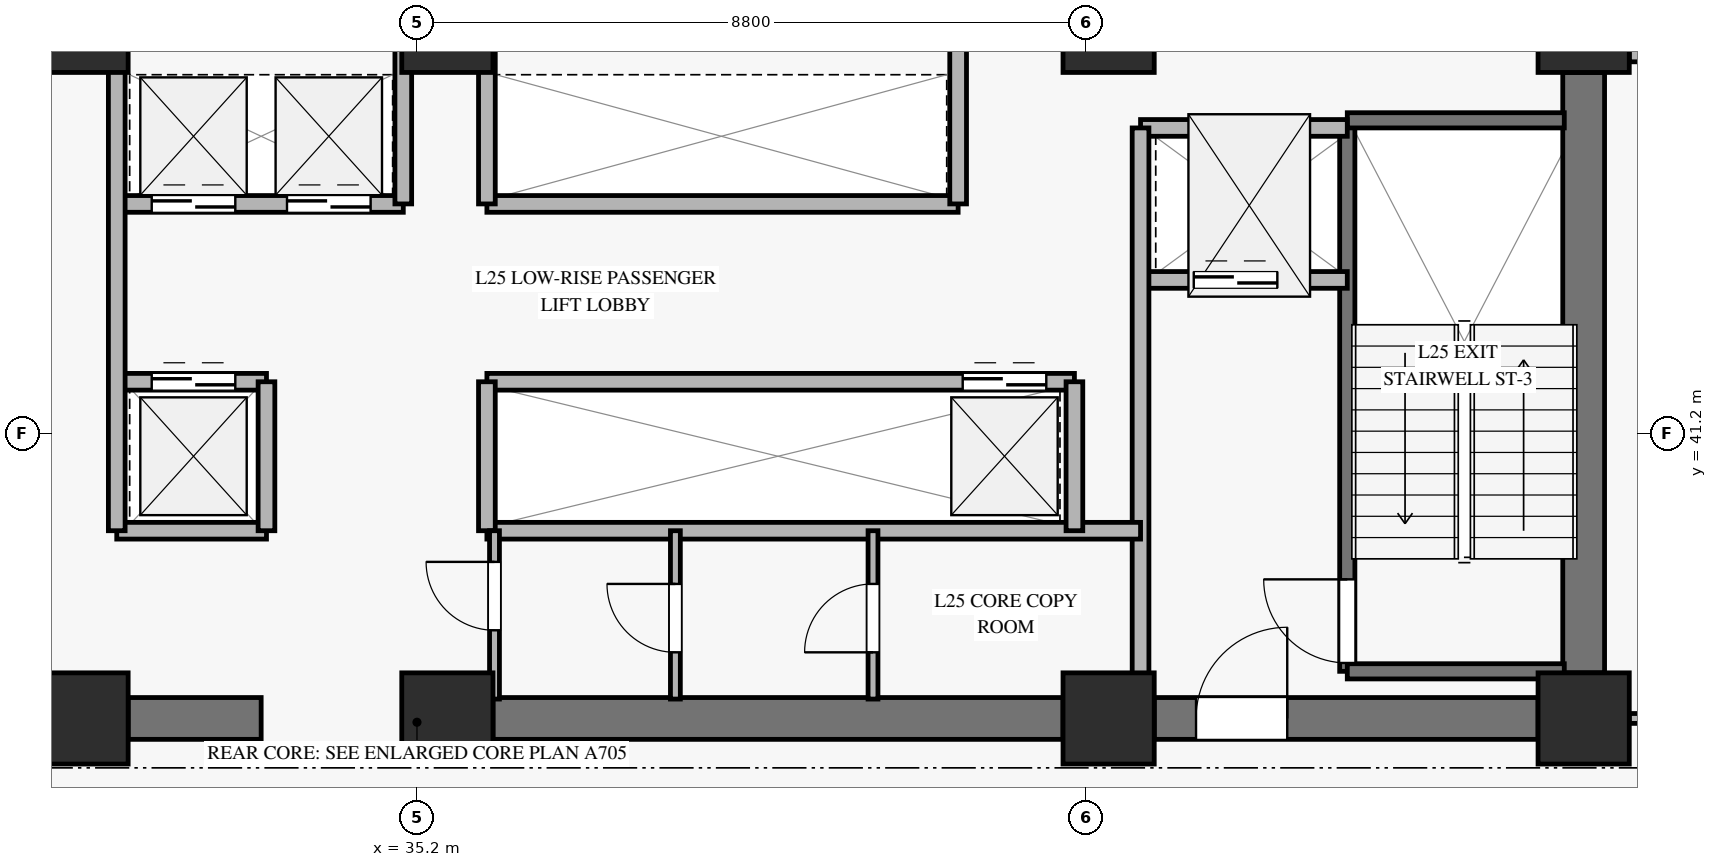
"""IFC4 building model, lengths in metres.
Left out: names, types, materials, properties, quantities, classifications, styles, units other than length and angle.
Written with IfcOpenShell. Run it as: python <this file> out.ifc"""

import sys

from ifc_helpers import new_model, si_unit, direction, frame, frame_2d, origin, origin_2d, place, context, subcontext, project, spatial, rectangle, extrude, source, transform, mapped, element, fill, save


model = new_model("IFC4")
c1 = context("Model", 3, precision=1e-05, world=origin(), true_north=direction((0.0, 1.0)))
c2 = subcontext(c1, "Body", "Model", "MODEL_VIEW")
j1 = project(units=[si_unit("LENGTHUNIT", "METRE"), si_unit("PLANEANGLEUNIT", "RADIAN")], contexts=[c1])
p1 = place(None, origin())
s1 = spatial("IfcSite", under=j1, at=p1, CompositionType="ELEMENT")
p2 = place(p1, origin())
s2 = spatial("IfcBuilding", under=s1, at=p2, CompositionType="ELEMENT")
p3 = place(p2, frame((0.0, 0.0, 103.6)))
s3 = spatial("IfcBuildingStorey", under=s2, at=p3, CompositionType="ELEMENT", Elevation=103.6)
m1 = source(origin(), c2, "Body", "SweptSolid", [
    extrude(rectangle(XDim=1.2, YDim=1.2, at=origin_2d()), origin(), (0.0, 0.0, 1.0), 3.68),
])
for number, where, z_axis, x_axis in (
    (1, (30.8, 37.45, 0.0), (0.0, 0.0, 1.0), (1.0, 0.0, 0.0)),
    (2, (30.8, 46.55, 0.0), (0.0, 0.0, 1.0), (1.0, 0.0, 0.0)),
    (3, (35.6, 37.45, 0.0), (0.0, 0.0, 1.0), (1.0, 0.0, 0.0)),
    (4, (35.6, 46.55, 0.0), (0.0, 0.0, 1.0), (1.0, 0.0, 0.0)),
    (5, (44.3, 37.45, 0.0), (0.0, 0.0, 1.0), (1.0, 0.0, 0.0)),
    (6, (44.3, 46.55, 0.0), (0.0, 0.0, 1.0), (1.0, 0.0, 0.0)),
    (7, (50.55, 37.45, 0.0), (0.0, 0.0, 1.0), (1.0, 0.0, 0.0)),
    (8, (50.55, 46.55, 0.0), (0.0, 0.0, 1.0), (1.0, 0.0, 0.0)),
):
    element("IfcColumn", number, at=place(p3, frame(where, z_axis=z_axis, x_axis=x_axis)), inside=s3, PredefinedType="PILASTER", context=c2, shape_type="MappedRepresentation", body=[
        mapped(m1, transform((0.0, 0.0, 0.0), x_axis=(1.0, 0.0, 0.0), y_axis=(0.0, 1.0, 0.0), z_axis=(0.0, 0.0, 1.0), scale=1.0)),
    ])
p4 = place(p3, frame((31.4, 37.45, 0.0), z_axis=(0.0, 0.0, 1.0), x_axis=(1.0, 0.0, 0.0)))
e9 = element("IfcWall", 9, at=p4, inside=s3, PredefinedType="SHEAR", context=c2, shape_type="SweptSolid", body=[
    extrude(rectangle(XDim=1.75, YDim=0.55, at=frame_2d((0.875, 0.0))), origin(), (0.0, 0.0, 1.0), 3.68),
])
p5 = place(p3, frame((36.2, 37.45, 0.0), z_axis=(0.0, 0.0, 1.0), x_axis=(1.0, 0.0, 0.0)))
e10 = element("IfcWall", 10, at=p5, inside=s3, PredefinedType="SHEAR", context=c2, shape_type="SweptSolid", body=[
    extrude(rectangle(XDim=7.5, YDim=0.55, at=frame_2d((3.75, 0.0))), origin(), (0.0, 0.0, 1.0), 3.68),
])
p6 = place(p3, frame((44.9, 37.45, 0.0), z_axis=(0.0, 0.0, 1.0), x_axis=(1.0, 0.0, 0.0)))
e11 = element("IfcWall", 11, at=p6, inside=s3, PredefinedType="SHEAR", context=c2, shape_type="SweptSolid", body=[
    extrude(rectangle(XDim=5.05, YDim=0.55, at=frame_2d((2.525, 0.0))), origin(), (0.0, 0.0, 1.0), 3.68),
])
p7 = place(p6, frame((0.55, 0.0, 0.0)))
e12 = element("IfcOpeningElement", 12, at=p7, cuts=e11, PredefinedType="OPENING", context=c2, shape_type="SweptSolid", body=[
    extrude(rectangle(XDim=1.2, YDim=2.15, at=frame_2d((0.6, 1.075))), frame((0.0, 0.285, 0.0), z_axis=(0.0, -1.0, 0.0), x_axis=(1.0, 0.0, 0.0)), (0.0, 0.0, 1.0), 0.57),
])
p8 = place(p3, frame((50.55, 38.05, 0.0), z_axis=(0.0, 0.0, 1.0), x_axis=(0.0, 1.0, 0.0)))
e13 = element("IfcWall", 13, at=p8, inside=s3, PredefinedType="SHEAR", context=c2, shape_type="SweptSolid", body=[
    extrude(rectangle(XDim=7.9, YDim=0.55, at=frame_2d((3.95, 0.0))), origin(), (0.0, 0.0, 1.0), 3.68),
])
p9 = place(p3, frame((51.15, 46.25, 0.0), z_axis=(0.0, 0.0, 1.0), x_axis=(1.0, 0.0, 0.0)))
e14 = element("IfcWall", 14, at=p9, inside=s3, PredefinedType="SOLIDWALL", context=c2, shape_type="SweptSolid", body=[
    extrude(rectangle(XDim=11.248, YDim=0.32, at=frame_2d((5.624, 0.0))), origin(), (0.0, 0.0, 1.0), 3.16),
])
p10 = place(p9, frame((4.824, 0.0, 0.45)))
e15 = element("IfcOpeningElement", 15, at=p10, cuts=e14, PredefinedType="OPENING", context=c2, shape_type="SweptSolid", body=[
    extrude(rectangle(XDim=1.6, YDim=2.0, at=frame_2d((0.8, 1.0))), frame((0.0, 0.17, 0.0), z_axis=(0.0, -1.0, 0.0), x_axis=(1.0, 0.0, 0.0)), (0.0, 0.0, 1.0), 0.34),
])
p11 = place(p3, frame((47.44, 38.07, 0.0), z_axis=(0.0, 0.0, 1.0), x_axis=(0.0, 1.0, 0.0)))
e16 = element("IfcWall", 16, at=p11, inside=s3, PredefinedType="SOLIDWALL", context=c2, shape_type="SweptSolid", body=[
    extrude(rectangle(XDim=7.25, YDim=0.2, at=frame_2d((3.625, 0.0))), origin(), (0.0, 0.0, 1.0), 3.9),
])
p12 = place(p11, frame((0.11, 0.0, 0.0)))
e17 = element("IfcOpeningElement", 17, at=p12, cuts=e16, PredefinedType="OPENING", context=c2, shape_type="SweptSolid", body=[
    extrude(rectangle(XDim=1.1, YDim=2.15, at=frame_2d((0.55, 1.075))), frame((0.0, 0.11, 0.0), z_axis=(0.0, -1.0, 0.0), x_axis=(1.0, 0.0, 0.0)), (0.0, 0.0, 1.0), 0.22),
])
for number, where, z_axis, x_axis in (
    (18, (47.44, 45.32, 0.0), (0.0, 0.0, 1.0), (1.0, 0.0, 0.0)),
    (19, (47.44, 38.07, 0.0), (0.0, 0.0, 1.0), (1.0, 0.0, 0.0)),
):
    element("IfcWall", number, at=place(p3, frame(where, z_axis=z_axis, x_axis=x_axis)), inside=s3, PredefinedType="SOLIDWALL", context=c2, shape_type="SweptSolid", body=[
        extrude(rectangle(XDim=2.855, YDim=0.2, at=frame_2d((1.427, 0.0))), origin(), (0.0, 0.0, 1.0), 3.9),
    ])
p13 = place(p3, frame((44.72, 43.22, 0.0), z_axis=(0.0, 0.0, 1.0), x_axis=(1.0, 0.0, 0.0)))
e20 = element("IfcWall", 20, at=p13, inside=s3, PredefinedType="SOLIDWALL", context=c2, shape_type="SweptSolid", body=[
    extrude(rectangle(XDim=2.72, YDim=0.22, at=frame_2d((1.36, 0.0))), origin(), (0.0, 0.0, 1.0), 3.68),
])
p14 = place(p13, frame((0.7, 0.0, 0.0)))
e21 = element("IfcOpeningElement", 21, at=p14, cuts=e20, PredefinedType="OPENING", context=c2, shape_type="SweptSolid", body=[
    extrude(rectangle(XDim=1.1, YDim=2.2, at=frame_2d((0.55, 1.1))), frame((0.0, 0.12, 0.0), z_axis=(0.0, -1.0, 0.0), x_axis=(1.0, 0.0, 0.0)), (0.0, 0.0, 1.0), 0.24),
])
p15 = place(p3, frame((44.72, 45.22, 0.0), z_axis=(0.0, 0.0, 1.0), x_axis=(1.0, 0.0, 0.0)))
e22 = element("IfcWall", 22, at=p15, inside=s3, PredefinedType="SOLIDWALL", context=c2, shape_type="SweptSolid", body=[
    extrude(rectangle(XDim=2.72, YDim=0.22, at=frame_2d((1.36, 0.0))), origin(), (0.0, 0.0, 1.0), 3.68),
])
p16 = place(p3, frame((44.72, 37.705, 0.0), z_axis=(0.0, 0.0, 1.0), x_axis=(0.0, 1.0, 0.0)))
e23 = element("IfcWall", 23, at=p16, inside=s3, PredefinedType="SOLIDWALL", context=c2, shape_type="SweptSolid", body=[
    extrude(rectangle(XDim=7.515, YDim=0.22, at=frame_2d((3.757, 0.0))), origin(), (0.0, 0.0, 1.0), 3.68),
])
p17 = place(p3, frame((31.25, 44.22, 0.0), z_axis=(0.0, 0.0, 1.0), x_axis=(1.0, 0.0, 0.0)))
e24 = element("IfcWall", 24, at=p17, inside=s3, PredefinedType="SOLIDWALL", context=c2, shape_type="SweptSolid", body=[
    extrude(rectangle(XDim=3.77, YDim=0.22, at=frame_2d((1.885, 0.0))), origin(), (0.0, 0.0, 1.0), 3.68),
])
p18 = place(p17, frame((0.46, 0.0, 0.0)))
e25 = element("IfcOpeningElement", 25, at=p18, cuts=e24, PredefinedType="OPENING", context=c2, shape_type="SweptSolid", body=[
    extrude(rectangle(XDim=1.1, YDim=2.2, at=frame_2d((0.55, 1.1))), frame((0.0, 0.12, 0.0), z_axis=(0.0, -1.0, 0.0), x_axis=(1.0, 0.0, 0.0)), (0.0, 0.0, 1.0), 0.24),
])
p19 = place(p17, frame((2.24, 0.0, 0.0)))
e26 = element("IfcOpeningElement", 26, at=p19, cuts=e24, PredefinedType="OPENING", context=c2, shape_type="SweptSolid", body=[
    extrude(rectangle(XDim=1.1, YDim=2.2, at=frame_2d((0.55, 1.1))), frame((0.0, 0.12, 0.0), z_axis=(0.0, -1.0, 0.0), x_axis=(1.0, 0.0, 0.0)), (0.0, 0.0, 1.0), 0.24),
])
p20 = place(p3, frame((36.12, 44.22, 0.0), z_axis=(0.0, 0.0, 1.0), x_axis=(1.0, 0.0, 0.0)))
e27 = element("IfcWall", 27, at=p20, inside=s3, PredefinedType="SOLIDWALL", context=c2, shape_type="SweptSolid", body=[
    extrude(rectangle(XDim=6.2, YDim=0.22, at=frame_2d((3.1, 0.0))), origin(), (0.0, 0.0, 1.0), 3.68),
])
for number, where, z_axis, x_axis in (
    (28, (35.02, 44.22, 0.0), (0.0, 0.0, 1.0), (0.0, 1.0, 0.0)),
    (29, (36.12, 44.22, 0.0), (0.0, 0.0, 1.0), (0.0, 1.0, 0.0)),
    (30, (42.32, 44.22, 0.0), (0.0, 0.0, 1.0), (0.0, 1.0, 0.0)),
):
    element("IfcWall", number, at=place(p3, frame(where, z_axis=z_axis, x_axis=x_axis)), inside=s3, PredefinedType="SOLIDWALL", context=c2, shape_type="SweptSolid", body=[
        extrude(rectangle(XDim=2.075, YDim=0.22, at=frame_2d((1.038, 0.0))), origin(), (0.0, 0.0, 1.0), 3.68),
    ])
p21 = place(p3, frame((31.25, 41.88, 0.0), z_axis=(0.0, 0.0, 1.0), x_axis=(1.0, 0.0, 0.0)))
e31 = element("IfcWall", 31, at=p21, inside=s3, PredefinedType="SOLIDWALL", context=c2, shape_type="SweptSolid", body=[
    extrude(rectangle(XDim=1.97, YDim=0.22, at=frame_2d((0.985, 0.0))), origin(), (0.0, 0.0, 1.0), 3.68),
])
p22 = place(p21, frame((0.46, 0.0, 0.0)))
e32 = element("IfcOpeningElement", 32, at=p22, cuts=e31, PredefinedType="OPENING", context=c2, shape_type="SweptSolid", body=[
    extrude(rectangle(XDim=1.1, YDim=2.2, at=frame_2d((0.55, 1.1))), frame((0.0, 0.12, 0.0), z_axis=(0.0, -1.0, 0.0), x_axis=(1.0, 0.0, 0.0)), (0.0, 0.0, 1.0), 0.24),
])
p23 = place(p3, frame((36.12, 41.88, 0.0), z_axis=(0.0, 0.0, 1.0), x_axis=(1.0, 0.0, 0.0)))
e33 = element("IfcWall", 33, at=p23, inside=s3, PredefinedType="SOLIDWALL", context=c2, shape_type="SweptSolid", body=[
    extrude(rectangle(XDim=7.73, YDim=0.22, at=frame_2d((3.865, 0.0))), origin(), (0.0, 0.0, 1.0), 3.68),
])
p24 = place(p23, frame((6.26, 0.0, 0.0)))
e34 = element("IfcOpeningElement", 34, at=p24, cuts=e33, PredefinedType="OPENING", context=c2, shape_type="SweptSolid", body=[
    extrude(rectangle(XDim=1.1, YDim=2.2, at=frame_2d((0.55, 1.1))), frame((0.0, 0.12, 0.0), z_axis=(0.0, -1.0, 0.0), x_axis=(1.0, 0.0, 0.0)), (0.0, 0.0, 1.0), 0.24),
])
p25 = place(p3, frame((31.25, 39.92, 0.0), z_axis=(0.0, 0.0, 1.0), x_axis=(1.0, 0.0, 0.0)))
e35 = element("IfcWall", 35, at=p25, inside=s3, PredefinedType="SOLIDWALL", context=c2, shape_type="SweptSolid", body=[
    extrude(rectangle(XDim=1.97, YDim=0.22, at=frame_2d((0.985, 0.0))), origin(), (0.0, 0.0, 1.0), 3.68),
])
p26 = place(p3, frame((33.22, 39.92, 0.0), z_axis=(0.0, 0.0, 1.0), x_axis=(0.0, 1.0, 0.0)))
e36 = element("IfcWall", 36, at=p26, inside=s3, PredefinedType="SOLIDWALL", context=c2, shape_type="SweptSolid", body=[
    extrude(rectangle(XDim=1.96, YDim=0.22, at=frame_2d((0.98, 0.0))), origin(), (0.0, 0.0, 1.0), 3.68),
])
p27 = place(p3, frame((36.12, 39.92, 0.0), z_axis=(0.0, 0.0, 1.0), x_axis=(1.0, 0.0, 0.0)))
e37 = element("IfcWall", 37, at=p27, inside=s3, PredefinedType="SOLIDWALL", context=c2, shape_type="SweptSolid", body=[
    extrude(rectangle(XDim=8.6, YDim=0.22, at=frame_2d((4.3, 0.0))), origin(), (0.0, 0.0, 1.0), 2.965),
])
p28 = place(p3, frame((36.12, 39.92, 0.0), z_axis=(0.0, 0.0, 1.0), x_axis=(0.0, 1.0, 0.0)))
e38 = element("IfcWall", 38, at=p28, inside=s3, PredefinedType="SOLIDWALL", context=c2, shape_type="SweptSolid", body=[
    extrude(rectangle(XDim=1.96, YDim=0.22, at=frame_2d((0.98, 0.0))), origin(), (0.0, 0.0, 1.0), 3.68),
])
p29 = place(p3, frame((31.25, 39.92, 0.0), z_axis=(0.0, 0.0, 1.0), x_axis=(0.0, 1.0, 0.0)))
e39 = element("IfcWall", 39, at=p29, inside=s3, PredefinedType="SOLIDWALL", context=c2, shape_type="SweptSolid", body=[
    extrude(rectangle(XDim=6.375, YDim=0.22, at=frame_2d((3.188, 0.0))), origin(), (0.0, 0.0, 1.0), 3.68),
])
p30 = place(p3, frame((43.85, 39.92, 0.0), z_axis=(0.0, 0.0, 1.0), x_axis=(0.0, 1.0, 0.0)))
e40 = element("IfcWall", 40, at=p30, inside=s3, PredefinedType="SOLIDWALL", context=c2, shape_type="SweptSolid", body=[
    extrude(rectangle(XDim=1.96, YDim=0.22, at=frame_2d((0.98, 0.0))), origin(), (0.0, 0.0, 1.0), 3.68),
])
p31 = place(p3, frame((36.22, 37.705, 0.0), z_axis=(0.0, 0.0, 1.0), x_axis=(0.0, 1.0, 0.0)))
e41 = element("IfcWall", 41, at=p31, inside=s3, PredefinedType="PARTITIONING", context=c2, shape_type="SweptSolid", body=[
    extrude(rectangle(XDim=2.215, YDim=0.13, at=frame_2d((1.107, 0.0))), origin(), (0.0, 0.0, 1.0), 3.68),
])
p32 = place(p31, frame((0.905, 0.0, 0.0)))
e42 = element("IfcOpeningElement", 42, at=p32, cuts=e41, PredefinedType="OPENING", context=c2, shape_type="SweptSolid", body=[
    extrude(rectangle(XDim=0.9, YDim=2.1, at=frame_2d((0.45, 1.05))), frame((0.0, 0.075, 0.0), z_axis=(0.0, -1.0, 0.0), x_axis=(1.0, 0.0, 0.0)), (0.0, 0.0, 1.0), 0.15),
])
p33 = place(p3, frame((38.6, 37.705, 0.0), z_axis=(0.0, 0.0, 1.0), x_axis=(0.0, 1.0, 0.0)))
e43 = element("IfcWall", 43, at=p33, inside=s3, PredefinedType="PARTITIONING", context=c2, shape_type="SweptSolid", body=[
    extrude(rectangle(XDim=2.215, YDim=0.13, at=frame_2d((1.107, 0.0))), origin(), (0.0, 0.0, 1.0), 3.68),
])
p34 = place(p33, frame((0.615, 0.0, 0.0)))
e44 = element("IfcOpeningElement", 44, at=p34, cuts=e43, PredefinedType="OPENING", context=c2, shape_type="SweptSolid", body=[
    extrude(rectangle(XDim=0.9, YDim=2.1, at=frame_2d((0.45, 1.05))), frame((0.0, 0.075, 0.0), z_axis=(0.0, -1.0, 0.0), x_axis=(1.0, 0.0, 0.0)), (0.0, 0.0, 1.0), 0.15),
])
p35 = place(p3, frame((41.2, 37.705, 0.0), z_axis=(0.0, 0.0, 1.0), x_axis=(0.0, 1.0, 0.0)))
e45 = element("IfcWall", 45, at=p35, inside=s3, PredefinedType="PARTITIONING", context=c2, shape_type="SweptSolid", body=[
    extrude(rectangle(XDim=2.215, YDim=0.13, at=frame_2d((1.107, 0.0))), origin(), (0.0, 0.0, 1.0), 3.68),
])
p36 = place(p35, frame((0.615, 0.0, 0.0)))
e46 = element("IfcOpeningElement", 46, at=p36, cuts=e45, PredefinedType="OPENING", context=c2, shape_type="SweptSolid", body=[
    extrude(rectangle(XDim=0.9, YDim=2.1, at=frame_2d((0.45, 1.05))), frame((0.0, 0.075, 0.0), z_axis=(0.0, -1.0, 0.0), x_axis=(1.0, 0.0, 0.0)), (0.0, 0.0, 1.0), 0.15),
])
p37 = place(p3, frame((51.15, 37.45, 0.0), z_axis=(0.0, 0.0, 1.0), x_axis=(1.0, 0.0, 0.0)))
e47 = element("IfcWall", 47, at=p37, inside=s3, PredefinedType="PARTITIONING", context=c2, shape_type="SweptSolid", body=[
    extrude(rectangle(XDim=14.741, YDim=0.13, at=frame_2d((7.371, 0.0))), origin(), (0.0, 0.0, 1.0), 3.165),
])
p38 = place(p37, frame((0.5, 0.0, 0.0)))
e48 = element("IfcOpeningElement", 48, at=p38, cuts=e47, PredefinedType="OPENING", context=c2, shape_type="SweptSolid", body=[
    extrude(rectangle(XDim=0.9, YDim=2.1, at=frame_2d((0.45, 1.05))), frame((0.0, 0.075, 0.0), z_axis=(0.0, -1.0, 0.0), x_axis=(1.0, 0.0, 0.0)), (0.0, 0.0, 1.0), 0.15),
])
p39 = place(p37, frame((10.759, 0.0, 0.0)))
e49 = element("IfcOpeningElement", 49, at=p39, cuts=e47, PredefinedType="OPENING", context=c2, shape_type="SweptSolid", body=[
    extrude(rectangle(XDim=0.95, YDim=2.1, at=frame_2d((0.475, 1.05))), frame((0.0, 0.075, 0.0), z_axis=(0.0, -1.0, 0.0), x_axis=(1.0, 0.0, 0.0)), (0.0, 0.0, 1.0), 0.15),
])
m2 = source(origin(), c2, "Body", "SweptSolid", [
    extrude(rectangle(XDim=1.1, YDim=2.15, at=frame_2d((0.55, 1.075))), frame((0.0, 0.025, 0.0), z_axis=(0.0, -1.0, 0.0), x_axis=(1.0, 0.0, 0.0)), (0.0, 0.0, 1.0), 0.05),
])
p40 = place(p12, origin())
e50 = element("IfcDoor", 50, at=p40, inside=s3, OperationType="SINGLE_SWING_RIGHT", PredefinedType="DOOR", context=c2, shape_type="MappedRepresentation", body=[
    mapped(m2, transform((0.0, 0.0, 0.0), x_axis=(1.0, 0.0, 0.0), y_axis=(0.0, 1.0, 0.0), z_axis=(0.0, 0.0, 1.0), scale=1.0)),
])
fill(e17, e50)
m3 = source(origin(), c2, "Body", "SweptSolid", [
    extrude(rectangle(XDim=1.1, YDim=2.2, at=frame_2d((0.55, 1.1))), frame((0.0, 0.025, 0.0), z_axis=(0.0, -1.0, 0.0), x_axis=(1.0, 0.0, 0.0)), (0.0, 0.0, 1.0), 0.05),
])
p41 = place(p14, origin())
e51 = element("IfcDoor", 51, at=p41, inside=s3, OperationType="SLIDING_TO_LEFT", PredefinedType="DOOR", context=c2, shape_type="MappedRepresentation", body=[
    mapped(m3, transform((0.0, 0.0, 0.0), x_axis=(1.0, 0.0, 0.0), y_axis=(0.0, 1.0, 0.0), z_axis=(0.0, 0.0, 1.0), scale=1.0)),
])
fill(e21, e51)
m4 = source(origin(), c2, "Body", "SweptSolid", [
    extrude(rectangle(XDim=1.2, YDim=2.15, at=frame_2d((0.6, 1.075))), frame((0.0, 0.025, 0.0), z_axis=(0.0, -1.0, 0.0), x_axis=(1.0, 0.0, 0.0)), (0.0, 0.0, 1.0), 0.05),
])
p42 = place(p7, origin())
e52 = element("IfcDoor", 52, at=p42, inside=s3, OperationType="SINGLE_SWING_RIGHT", PredefinedType="DOOR", context=c2, shape_type="MappedRepresentation", body=[
    mapped(m4, transform((0.0, 0.0, 0.0), x_axis=(1.0, 0.0, 0.0), y_axis=(0.0, 1.0, 0.0), z_axis=(0.0, 0.0, 1.0), scale=1.0)),
])
fill(e12, e52)
p43 = place(p18, origin())
e53 = element("IfcDoor", 53, at=p43, inside=s3, OperationType="SLIDING_TO_LEFT", PredefinedType="DOOR", context=c2, shape_type="MappedRepresentation", body=[
    mapped(m3, transform((0.0, 0.0, 0.0), x_axis=(1.0, 0.0, 0.0), y_axis=(0.0, 1.0, 0.0), z_axis=(0.0, 0.0, 1.0), scale=1.0)),
])
fill(e25, e53)
p44 = place(p19, origin())
e54 = element("IfcDoor", 54, at=p44, inside=s3, OperationType="SLIDING_TO_LEFT", PredefinedType="DOOR", context=c2, shape_type="MappedRepresentation", body=[
    mapped(m3, transform((0.0, 0.0, 0.0), x_axis=(1.0, 0.0, 0.0), y_axis=(0.0, 1.0, 0.0), z_axis=(0.0, 0.0, 1.0), scale=1.0)),
])
fill(e26, e54)
p45 = place(p22, origin())
e55 = element("IfcDoor", 55, at=p45, inside=s3, OperationType="SLIDING_TO_LEFT", PredefinedType="DOOR", context=c2, shape_type="MappedRepresentation", body=[
    mapped(m3, transform((0.0, 0.0, 0.0), x_axis=(1.0, 0.0, 0.0), y_axis=(0.0, 1.0, 0.0), z_axis=(0.0, 0.0, 1.0), scale=1.0)),
])
fill(e32, e55)
p46 = place(p24, origin())
e56 = element("IfcDoor", 56, at=p46, inside=s3, OperationType="SLIDING_TO_LEFT", PredefinedType="DOOR", context=c2, shape_type="MappedRepresentation", body=[
    mapped(m3, transform((0.0, 0.0, 0.0), x_axis=(1.0, 0.0, 0.0), y_axis=(0.0, 1.0, 0.0), z_axis=(0.0, 0.0, 1.0), scale=1.0)),
])
fill(e34, e56)
m5 = source(origin(), c2, "Body", "SweptSolid", [
    extrude(rectangle(XDim=0.9, YDim=2.1, at=frame_2d((0.45, 1.05))), frame((0.0, 0.025, 0.0), z_axis=(0.0, -1.0, 0.0), x_axis=(1.0, 0.0, 0.0)), (0.0, 0.0, 1.0), 0.05),
])
p47 = place(p32, origin())
e57 = element("IfcDoor", 57, at=p47, inside=s3, OperationType="SINGLE_SWING_RIGHT", PredefinedType="DOOR", context=c2, shape_type="MappedRepresentation", body=[
    mapped(m5, transform((0.0, 0.0, 0.0), x_axis=(1.0, 0.0, 0.0), y_axis=(0.0, 1.0, 0.0), z_axis=(0.0, 0.0, 1.0), scale=1.0)),
])
fill(e42, e57)
p48 = place(p34, origin())
e58 = element("IfcDoor", 58, at=p48, inside=s3, OperationType="SINGLE_SWING_RIGHT", PredefinedType="DOOR", context=c2, shape_type="MappedRepresentation", body=[
    mapped(m5, transform((0.0, 0.0, 0.0), x_axis=(1.0, 0.0, 0.0), y_axis=(0.0, 1.0, 0.0), z_axis=(0.0, 0.0, 1.0), scale=1.0)),
])
fill(e44, e58)
p49 = place(p36, origin())
e59 = element("IfcDoor", 59, at=p49, inside=s3, OperationType="SINGLE_SWING_LEFT", PredefinedType="DOOR", context=c2, shape_type="MappedRepresentation", body=[
    mapped(m5, transform((0.0, 0.0, 0.0), x_axis=(1.0, 0.0, 0.0), y_axis=(0.0, 1.0, 0.0), z_axis=(0.0, 0.0, 1.0), scale=1.0)),
])
fill(e46, e59)
save(model, sys.argv[1])
